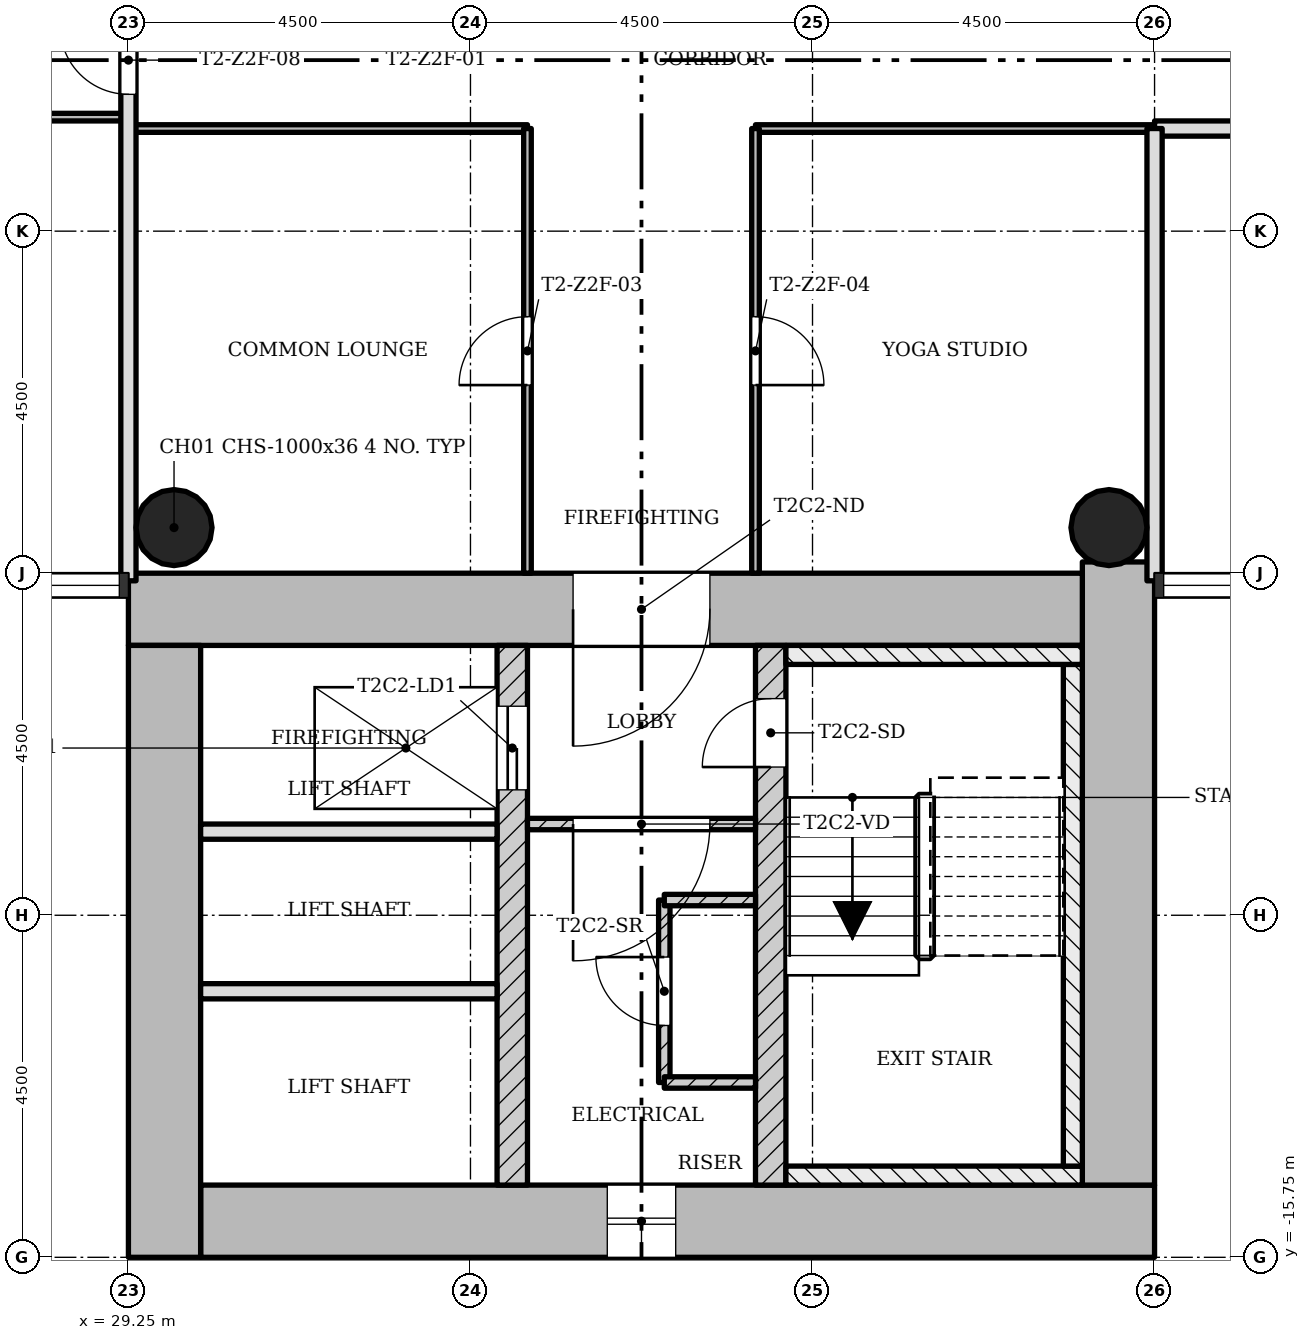
"""IFC4 building model, lengths in metres.
Left out: names, types, materials, properties, quantities, classifications, styles, units other than length and angle.
Written with IfcOpenShell. Run it as: python <this file> out.ifc"""

import sys

from ifc_helpers import new_model, si_unit, direction, frame, frame_2d, origin, origin_2d, place, context, subcontext, project, spatial, rectangle, hollow_circle, extrude, element, fill, save


model = new_model("IFC4")
c1 = context("Model", 3, precision=1e-05, world=origin(), true_north=direction((0.0, 1.0)))
c2 = subcontext(c1, "Body", "Model", "MODEL_VIEW")
j1 = project(units=[si_unit("LENGTHUNIT", "METRE"), si_unit("PLANEANGLEUNIT", "RADIAN")], contexts=[c1])
p1 = place(None, origin())
s1 = spatial("IfcSite", under=j1, at=p1, CompositionType="ELEMENT")
p2 = place(p1, origin())
s2 = spatial("IfcBuilding", under=s1, at=p2, CompositionType="ELEMENT")
p3 = place(p2, frame((0.0, 0.0, 114.0)))
s3 = spatial("IfcBuildingStorey", under=s2, at=p3, CompositionType="ELEMENT", Elevation=114.0)
p4 = place(p3, frame((30.2, -15.275, 0.0), z_axis=(0.0, 0.0, 1.0), x_axis=(1.0, 0.0, 0.0)))
e1 = element("IfcWall", 1, at=p4, inside=s3, PredefinedType="SHEAR", context=c2, shape_type="SweptSolid", body=[
    extrude(rectangle(XDim=12.55, YDim=0.95, at=frame_2d((6.275, 0.0))), origin(), (0.0, 0.0, 1.0), 3.4),
])
p5 = place(p4, frame((5.35, 0.0, 0.45)))
e2 = element("IfcOpeningElement", 2, at=p5, cuts=e1, PredefinedType="OPENING", context=c2, shape_type="SweptSolid", body=[
    extrude(rectangle(XDim=0.9, YDim=2.4, at=frame_2d((0.45, 1.2))), frame((0.0, 0.485, 0.0), z_axis=(0.0, -1.0, 0.0), x_axis=(1.0, 0.0, 0.0)), (0.0, 0.0, 1.0), 0.97),
])
p6 = place(p3, frame((42.275, -14.8, 0.0), z_axis=(0.0, 0.0, 1.0), x_axis=(0.0, 1.0, 0.0)))
e3 = element("IfcWall", 3, at=p6, inside=s3, PredefinedType="SHEAR", context=c2, shape_type="SweptSolid", body=[
    extrude(rectangle(XDim=8.198, YDim=0.95, at=frame_2d((4.099, 0.0))), origin(), (0.0, 0.0, 1.0), 3.4),
])
p7 = place(p3, frame((41.8, -7.225, 0.0), z_axis=(0.0, 0.0, 1.0), x_axis=(-1.0, 0.0, 0.0)))
e4 = element("IfcWall", 4, at=p7, inside=s3, PredefinedType="SHEAR", context=c2, shape_type="SweptSolid", body=[
    extrude(rectangle(XDim=12.55, YDim=0.95, at=frame_2d((6.275, 0.0))), origin(), (0.0, 0.0, 1.0), 3.4),
])
p8 = place(p7, frame((4.9, 0.0, 0.0)))
e5 = element("IfcOpeningElement", 5, at=p8, cuts=e4, PredefinedType="OPENING", context=c2, shape_type="SweptSolid", body=[
    extrude(rectangle(XDim=1.8, YDim=2.1, at=frame_2d((0.9, 1.05))), frame((0.0, 0.485, 0.0), z_axis=(0.0, -1.0, 0.0), x_axis=(1.0, 0.0, 0.0)), (0.0, 0.0, 1.0), 0.97),
])
p9 = place(p3, frame((29.725, -7.7, 0.0), z_axis=(0.0, 0.0, 1.0), x_axis=(0.0, -1.0, 0.0)))
e6 = element("IfcWall", 6, at=p9, inside=s3, PredefinedType="SHEAR", context=c2, shape_type="SweptSolid", body=[
    extrude(rectangle(XDim=8.05, YDim=0.95, at=frame_2d((4.025, 0.0))), origin(), (0.0, 0.0, 1.0), 3.4),
])
p10 = place(p3, frame((34.3, -14.8, 0.0), z_axis=(0.0, 0.0, 1.0), x_axis=(0.0, 1.0, 0.0)))
e7 = element("IfcWall", 7, at=p10, inside=s3, PredefinedType="SHEAR", context=c2, shape_type="SweptSolid", body=[
    extrude(rectangle(XDim=7.1, YDim=0.4, at=frame_2d((3.55, 0.0))), origin(), (0.0, 0.0, 1.0), 3.4),
])
p11 = place(p10, frame((5.2, 0.0, 0.0)))
e8 = element("IfcOpeningElement", 8, at=p11, cuts=e7, PredefinedType="OPENING", context=c2, shape_type="SweptSolid", body=[
    extrude(rectangle(XDim=1.1, YDim=2.1, at=frame_2d((0.55, 1.05))), frame((0.0, 0.21, 0.0), z_axis=(0.0, -1.0, 0.0), x_axis=(1.0, 0.0, 0.0)), (0.0, 0.0, 1.0), 0.42),
])
p12 = place(p3, frame((37.7, -14.8, 0.0), z_axis=(0.0, 0.0, 1.0), x_axis=(0.0, 1.0, 0.0)))
e9 = element("IfcWall", 9, at=p12, inside=s3, PredefinedType="SHEAR", context=c2, shape_type="SweptSolid", body=[
    extrude(rectangle(XDim=7.1, YDim=0.4, at=frame_2d((3.55, 0.0))), origin(), (0.0, 0.0, 1.0), 3.4),
])
p13 = place(p12, frame((5.5, 0.0, 0.0)))
e10 = element("IfcOpeningElement", 10, at=p13, cuts=e9, PredefinedType="OPENING", context=c2, shape_type="SweptSolid", body=[
    extrude(rectangle(XDim=0.9, YDim=2.1, at=frame_2d((0.45, 1.05))), frame((0.0, 0.21, 0.0), z_axis=(0.0, -1.0, 0.0), x_axis=(1.0, 0.0, 0.0)), (0.0, 0.0, 1.0), 0.42),
])
for number, where, z_axis, x_axis in (
    (11, (42.15, -6.15, 0.0), (0.0, 0.0, 1.0), (1.0, 0.0, 0.0)),
    (12, (29.85, -6.15, 0.0), (0.0, 0.0, 1.0), (1.0, 0.0, 0.0)),
):
    element("IfcColumn", number, at=place(p3, frame(where, z_axis=z_axis, x_axis=x_axis)), inside=s3, PredefinedType="COLUMN", context=c2, shape_type="SweptSolid", body=[
        extrude(hollow_circle(Radius=0.5, WallThickness=0.036, at=origin_2d()), origin(), (0.0, 0.0, 1.0), 3.4),
    ])
p14 = place(p3, frame((34.5, -10.05, 0.0), z_axis=(0.0, 0.0, 1.0), x_axis=(1.0, 0.0, 0.0)))
e13 = element("IfcWall", 13, at=p14, inside=s3, PredefinedType="PARTITIONING", context=c2, shape_type="SweptSolid", body=[
    extrude(rectangle(XDim=3.0, YDim=0.15, at=frame_2d((1.5, 0.0))), origin(), (0.0, 0.0, 1.0), 3.0),
])
p15 = place(p14, frame((0.6, 0.0, 0.0)))
e14 = element("IfcOpeningElement", 14, at=p15, cuts=e13, PredefinedType="OPENING", context=c2, shape_type="SweptSolid", body=[
    extrude(rectangle(XDim=1.8, YDim=2.1, at=frame_2d((0.9, 1.05))), frame((0.0, 0.085, 0.0), z_axis=(0.0, -1.0, 0.0), x_axis=(1.0, 0.0, 0.0)), (0.0, 0.0, 1.0), 0.17),
])
for number, where, z_axis, x_axis in (
    (15, (30.2, -10.15, 0.0), (0.0, 0.0, 1.0), (1.0, 0.0, 0.0)),
    (16, (30.2, -12.25, 0.0), (0.0, 0.0, 1.0), (1.0, 0.0, 0.0)),
):
    element("IfcWall", number, at=place(p3, frame(where, z_axis=z_axis, x_axis=x_axis)), inside=s3, PredefinedType="SOLIDWALL", context=c2, shape_type="SweptSolid", body=[
        extrude(rectangle(XDim=3.9, YDim=0.2, at=frame_2d((1.95, 0.0))), origin(), (0.0, 0.0, 1.0), 3.0),
    ])
p16 = place(p3, frame((36.3, -11.05, 0.0), z_axis=(0.0, 0.0, 1.0), x_axis=(0.0, -1.0, 0.0)))
e17 = element("IfcWall", 17, at=p16, inside=s3, PredefinedType="PARTITIONING", context=c2, shape_type="SweptSolid", body=[
    extrude(rectangle(XDim=2.4, YDim=0.15, at=frame_2d((1.2, 0.0))), origin(), (0.0, 0.0, 1.0), 3.0),
])
p17 = place(p16, frame((0.75, 0.0, 0.0)))
e18 = element("IfcOpeningElement", 18, at=p17, cuts=e17, PredefinedType="OPENING", context=c2, shape_type="SweptSolid", body=[
    extrude(rectangle(XDim=0.9, YDim=2.1, at=frame_2d((0.45, 1.05))), frame((0.0, 0.085, 0.0), z_axis=(0.0, -1.0, 0.0), x_axis=(1.0, 0.0, 0.0)), (0.0, 0.0, 1.0), 0.17),
])
for number, where, z_axis, x_axis in (
    (19, (36.3, -11.05, 0.0), (0.0, 0.0, 1.0), (1.0, 0.0, 0.0)),
    (20, (36.3, -13.45, 0.0), (0.0, 0.0, 1.0), (1.0, 0.0, 0.0)),
):
    element("IfcWall", number, at=place(p3, frame(where, z_axis=z_axis, x_axis=x_axis)), inside=s3, PredefinedType="PARTITIONING", context=c2, shape_type="SweptSolid", body=[
        extrude(rectangle(XDim=1.2, YDim=0.15, at=frame_2d((0.6, 0.0))), origin(), (0.0, 0.0, 1.0), 3.0),
    ])
for number, where, z_axis, x_axis in (
    (21, (42.75, -0.9, 0.0), (0.0, 0.0, 1.0), (-1.0, 0.0, 0.0)),
    (22, (34.5, -0.9, 0.0), (0.0, 0.0, 1.0), (-1.0, 0.0, 0.0)),
):
    element("IfcWall", number, at=place(p3, frame(where, z_axis=z_axis, x_axis=x_axis)), inside=s3, PredefinedType="PARTITIONING", context=c2, shape_type="SweptSolid", body=[
        extrude(rectangle(XDim=5.25, YDim=0.1, at=frame_2d((2.625, 0.0))), origin(), (0.0, 0.0, 1.0), 3.0),
    ])
p18 = place(p3, frame((44.55, -0.9, 0.0), z_axis=(0.0, 0.0, 1.0), x_axis=(-1.0, 0.0, 0.0)))
e23 = element("IfcWall", 23, at=p18, inside=s3, PredefinedType="SOLIDWALL", context=c2, shape_type="SweptSolid", body=[
    extrude(rectangle(XDim=1.8, YDim=0.2, at=frame_2d((0.9, 0.0))), origin(), (0.0, 0.0, 1.0), 3.0),
])
p19 = place(p3, frame((29.25, -0.75, 0.0), z_axis=(0.0, 0.0, 1.0), x_axis=(-1.0, 0.0, 0.0)))
e24 = element("IfcWall", 24, at=p19, inside=s3, PredefinedType="PARTITIONING", context=c2, shape_type="SweptSolid", body=[
    extrude(rectangle(XDim=4.5, YDim=0.1, at=frame_2d((2.25, 0.0))), origin(), (0.0, 0.0, 1.0), 3.0),
])
p20 = place(p19, frame((1.8, 0.0, 0.0)))
e25 = element("IfcOpeningElement", 25, at=p20, cuts=e24, PredefinedType="OPENING", context=c2, shape_type="SweptSolid", body=[
    extrude(rectangle(XDim=0.9, YDim=2.1, at=frame_2d((0.45, 1.05))), frame((0.0, 0.06, 0.0), z_axis=(0.0, -1.0, 0.0), x_axis=(1.0, 0.0, 0.0)), (0.0, 0.0, 1.0), 0.12),
])
p21 = place(p3, frame((42.75, -6.85, 0.0), z_axis=(0.0, 0.0, 1.0), x_axis=(0.0, 1.0, 0.0)))
e26 = element("IfcWall", 26, at=p21, inside=s3, PredefinedType="SOLIDWALL", context=c2, shape_type="SweptSolid", body=[
    extrude(rectangle(XDim=5.95, YDim=0.2, at=frame_2d((2.975, 0.0))), origin(), (0.0, 0.0, 1.0), 3.0),
])
p22 = place(p3, frame((37.5, -6.75, 0.0), z_axis=(0.0, 0.0, 1.0), x_axis=(0.0, 1.0, 0.0)))
e27 = element("IfcWall", 27, at=p22, inside=s3, PredefinedType="PARTITIONING", context=c2, shape_type="SweptSolid", body=[
    extrude(rectangle(XDim=5.85, YDim=0.1, at=frame_2d((2.925, 0.0))), origin(), (0.0, 0.0, 1.0), 3.0),
])
p23 = place(p22, frame((2.475, 0.0, 0.0)))
e28 = element("IfcOpeningElement", 28, at=p23, cuts=e27, PredefinedType="OPENING", context=c2, shape_type="SweptSolid", body=[
    extrude(rectangle(XDim=0.9, YDim=2.1, at=frame_2d((0.45, 1.05))), frame((0.0, 0.06, 0.0), z_axis=(0.0, -1.0, 0.0), x_axis=(1.0, 0.0, 0.0)), (0.0, 0.0, 1.0), 0.12),
])
p24 = place(p3, frame((34.5, -6.75, 0.0), z_axis=(0.0, 0.0, 1.0), x_axis=(0.0, 1.0, 0.0)))
e29 = element("IfcWall", 29, at=p24, inside=s3, PredefinedType="PARTITIONING", context=c2, shape_type="SweptSolid", body=[
    extrude(rectangle(XDim=5.85, YDim=0.1, at=frame_2d((2.925, 0.0))), origin(), (0.0, 0.0, 1.0), 3.0),
])
p25 = place(p24, frame((2.475, 0.0, 0.0)))
e30 = element("IfcOpeningElement", 30, at=p25, cuts=e29, PredefinedType="OPENING", context=c2, shape_type="SweptSolid", body=[
    extrude(rectangle(XDim=0.9, YDim=2.1, at=frame_2d((0.45, 1.05))), frame((0.0, 0.06, 0.0), z_axis=(0.0, -1.0, 0.0), x_axis=(1.0, 0.0, 0.0)), (0.0, 0.0, 1.0), 0.12),
])
p26 = place(p3, frame((29.25, -6.85, 0.0), z_axis=(0.0, 0.0, 1.0), x_axis=(0.0, 1.0, 0.0)))
e31 = element("IfcWall", 31, at=p26, inside=s3, PredefinedType="SOLIDWALL", context=c2, shape_type="SweptSolid", body=[
    extrude(rectangle(XDim=13.7, YDim=0.2, at=frame_2d((6.85, 0.0))), origin(), (0.0, 0.0, 1.0), 3.0),
])
p27 = place(p26, frame((6.4, 0.0, 0.0)))
e32 = element("IfcOpeningElement", 32, at=p27, cuts=e31, PredefinedType="OPENING", context=c2, shape_type="SweptSolid", body=[
    extrude(rectangle(XDim=0.9, YDim=2.1, at=frame_2d((0.45, 1.05))), frame((0.0, 0.11, 0.0), z_axis=(0.0, -1.0, 0.0), x_axis=(1.0, 0.0, 0.0)), (0.0, 0.0, 1.0), 0.22),
])
p28 = place(p3, frame((37.9, -14.675, 0.0), z_axis=(0.0, 0.0, 1.0), x_axis=(1.0, 0.0, 0.0)))
e33 = element("IfcWall", 33, at=p28, inside=s3, PredefinedType="SHEAR", context=c2, shape_type="SweptSolid", body=[
    extrude(rectangle(XDim=3.9, YDim=0.25, at=frame_2d((1.95, 0.0))), origin(), (0.0, 0.0, 1.0), 3.4),
])
p29 = place(p3, frame((41.675, -7.95, 0.0), z_axis=(0.0, 0.0, 1.0), x_axis=(0.0, -1.0, 0.0)))
e34 = element("IfcWall", 34, at=p29, inside=s3, PredefinedType="SHEAR", context=c2, shape_type="SweptSolid", body=[
    extrude(rectangle(XDim=6.6, YDim=0.25, at=frame_2d((3.3, 0.0))), origin(), (0.0, 0.0, 1.0), 3.4),
])
p30 = place(p3, frame((37.9, -7.825, 0.0), z_axis=(0.0, 0.0, 1.0), x_axis=(1.0, 0.0, 0.0)))
e35 = element("IfcWall", 35, at=p30, inside=s3, PredefinedType="SHEAR", context=c2, shape_type="SweptSolid", body=[
    extrude(rectangle(XDim=3.9, YDim=0.25, at=frame_2d((1.95, 0.0))), origin(), (0.0, 0.0, 1.0), 3.4),
])
p31 = place(p5, origin())
e36 = element("IfcWindow", 36, at=p31, inside=s3, PartitioningType="SINGLE_PANEL", PredefinedType="WINDOW", context=c2, shape_type="SweptSolid", body=[
    extrude(rectangle(XDim=0.9, YDim=2.4, at=frame_2d((0.45, 1.2))), frame((0.0, 0.03, 0.0), z_axis=(0.0, -1.0, 0.0), x_axis=(1.0, 0.0, 0.0)), (0.0, 0.0, 1.0), 0.06),
])
fill(e2, e36)
p32 = place(p15, origin())
e37 = element("IfcDoor", 37, at=p32, inside=s3, OperationType="SINGLE_SWING_LEFT", PredefinedType="DOOR", context=c2, shape_type="SweptSolid", body=[
    extrude(rectangle(XDim=1.8, YDim=2.1, at=frame_2d((0.9, 1.05))), frame((0.0, 0.025, 0.0), z_axis=(0.0, -1.0, 0.0), x_axis=(1.0, 0.0, 0.0)), (0.0, 0.0, 1.0), 0.05),
])
fill(e14, e37)
p33 = place(p17, origin())
e38 = element("IfcDoor", 38, at=p33, inside=s3, OperationType="SINGLE_SWING_LEFT", PredefinedType="DOOR", context=c2, shape_type="SweptSolid", body=[
    extrude(rectangle(XDim=0.9, YDim=2.1, at=frame_2d((0.45, 1.05))), frame((0.0, 0.025, 0.0), z_axis=(0.0, -1.0, 0.0), x_axis=(1.0, 0.0, 0.0)), (0.0, 0.0, 1.0), 0.05),
])
fill(e18, e38)
p34 = place(p25, origin())
e39 = element("IfcDoor", 39, at=p34, inside=s3, OperationType="SINGLE_SWING_RIGHT", PredefinedType="DOOR", context=c2, shape_type="SweptSolid", body=[
    extrude(rectangle(XDim=0.9, YDim=2.1, at=frame_2d((0.45, 1.05))), frame((0.0, 0.025, 0.0), z_axis=(0.0, -1.0, 0.0), x_axis=(1.0, 0.0, 0.0)), (0.0, 0.0, 1.0), 0.05),
])
fill(e30, e39)
p35 = place(p23, origin())
e40 = element("IfcDoor", 40, at=p35, inside=s3, OperationType="SINGLE_SWING_LEFT", PredefinedType="DOOR", context=c2, shape_type="SweptSolid", body=[
    extrude(rectangle(XDim=0.9, YDim=2.1, at=frame_2d((0.45, 1.05))), frame((0.0, 0.025, 0.0), z_axis=(0.0, -1.0, 0.0), x_axis=(1.0, 0.0, 0.0)), (0.0, 0.0, 1.0), 0.05),
])
fill(e28, e40)
p36 = place(p27, origin())
e41 = element("IfcDoor", 41, at=p36, inside=s3, OperationType="SINGLE_SWING_LEFT", PredefinedType="DOOR", context=c2, shape_type="SweptSolid", body=[
    extrude(rectangle(XDim=0.9, YDim=2.1, at=frame_2d((0.45, 1.05))), frame((0.0, 0.025, 0.0), z_axis=(0.0, -1.0, 0.0), x_axis=(1.0, 0.0, 0.0)), (0.0, 0.0, 1.0), 0.05),
])
fill(e32, e41)
p37 = place(p13, origin())
e42 = element("IfcDoor", 42, at=p37, inside=s3, OperationType="SINGLE_SWING_RIGHT", PredefinedType="DOOR", context=c2, shape_type="SweptSolid", body=[
    extrude(rectangle(XDim=0.9, YDim=2.1, at=frame_2d((0.45, 1.05))), frame((0.0, 0.025, 0.0), z_axis=(0.0, -1.0, 0.0), x_axis=(1.0, 0.0, 0.0)), (0.0, 0.0, 1.0), 0.05),
])
fill(e10, e42)
p38 = place(p11, origin())
e43 = element("IfcDoor", 43, at=p38, inside=s3, OperationType="SLIDING_TO_LEFT", PredefinedType="DOOR", context=c2, shape_type="SweptSolid", body=[
    extrude(rectangle(XDim=1.1, YDim=2.1, at=frame_2d((0.55, 1.05))), frame((0.0, 0.025, 0.0), z_axis=(0.0, -1.0, 0.0), x_axis=(1.0, 0.0, 0.0)), (0.0, 0.0, 1.0), 0.05),
])
fill(e8, e43)
p39 = place(p8, origin())
e44 = element("IfcDoor", 44, at=p39, inside=s3, OperationType="SINGLE_SWING_LEFT", PredefinedType="DOOR", context=c2, shape_type="SweptSolid", body=[
    extrude(rectangle(XDim=1.8, YDim=2.1, at=frame_2d((0.9, 1.05))), frame((0.0, 0.025, 0.0), z_axis=(0.0, -1.0, 0.0), x_axis=(1.0, 0.0, 0.0)), (0.0, 0.0, 1.0), 0.05),
])
fill(e5, e44)
save(model, sys.argv[1])
